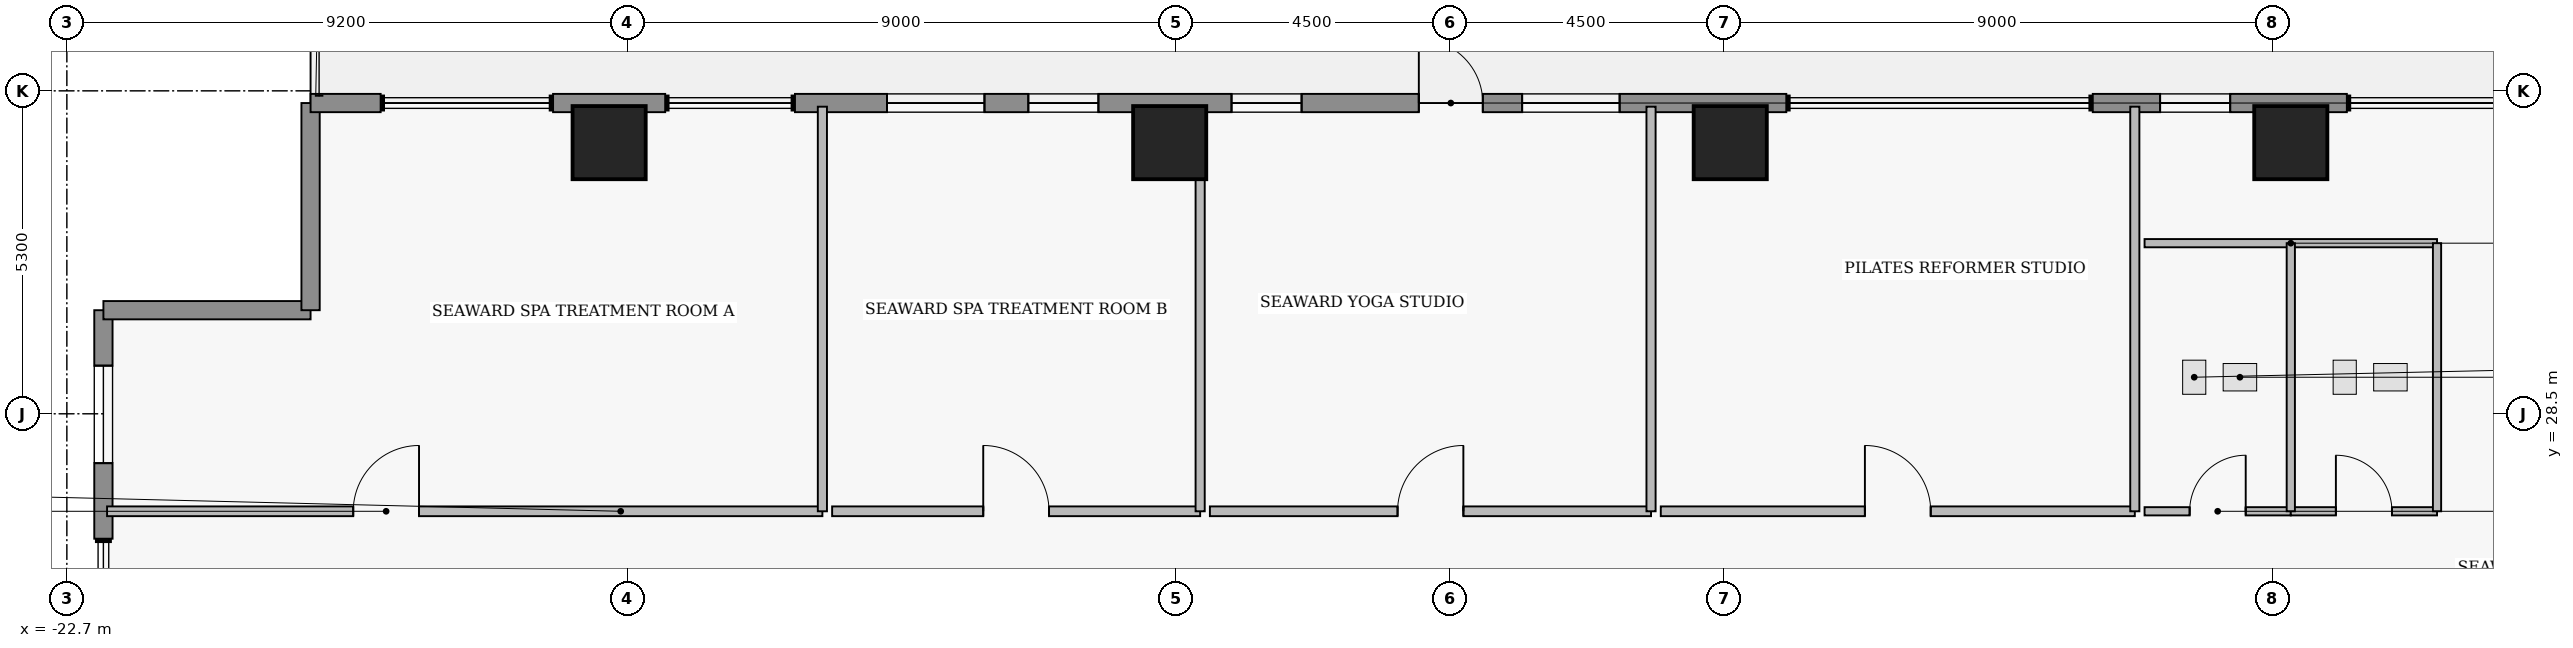
"""IFC4 building model, lengths in metres.
Left out: names, types, materials, properties, quantities, classifications, styles, units other than length and angle.
Written with IfcOpenShell. Run it as: python <this file> out.ifc"""

import sys

from ifc_helpers import new_model, si_unit, direction, frame, frame_2d, origin, origin_2d, place, context, subcontext, project, spatial, rectangle, extrude, element, fill, save


model = new_model("IFC4")
c1 = context("Model", 3, precision=1e-05, world=origin(), true_north=direction((0.0, 1.0)))
c2 = subcontext(c1, "Body", "Model", "MODEL_VIEW")
j1 = project(units=[si_unit("LENGTHUNIT", "METRE"), si_unit("PLANEANGLEUNIT", "RADIAN")], contexts=[c1])
p1 = place(None, origin())
s1 = spatial("IfcSite", under=j1, at=p1, CompositionType="ELEMENT")
p2 = place(p1, origin())
s2 = spatial("IfcBuilding", under=s1, at=p2, CompositionType="ELEMENT")
p3 = place(p2, frame((0.0, 0.0, 172.8)))
s3 = spatial("IfcBuildingStorey", under=s2, at=p3, CompositionType="ELEMENT", Elevation=172.8)
for number, where, z_axis, x_axis in (
    (1, (-13.8, 32.95, 0.0), (0.0, 0.0, 1.0), (1.0, 0.0, 0.0)),
    (2, (-4.6, 32.95, 0.0), (0.0, 0.0, 1.0), (1.0, 0.0, 0.0)),
    (3, (4.6, 32.95, 0.0), (0.0, 0.0, 1.0), (1.0, 0.0, 0.0)),
    (4, (13.8, 32.95, 0.0), (0.0, 0.0, 1.0), (1.0, 0.0, 0.0)),
):
    element("IfcColumn", number, at=place(p3, frame(where, z_axis=z_axis, x_axis=x_axis)), inside=s3, PredefinedType="COLUMN", context=c2, shape_type="SweptSolid", body=[
        extrude(rectangle(XDim=1.2, YDim=1.2, at=origin_2d()), origin(), (0.0, 0.0, 1.0), 4.6),
    ])
p4 = place(p3, frame((-22.1, 26.45, 0.0), z_axis=(0.0, 0.0, 1.0), x_axis=(0.0, 1.0, 0.0)))
e5 = element("IfcWall", 5, at=p4, inside=s3, PredefinedType="STANDARD", context=c2, shape_type="SweptSolid", body=[
    extrude(rectangle(XDim=3.75, YDim=0.3, at=frame_2d((1.875, 0.0))), origin(), (0.0, 0.0, 1.0), 4.38),
])
p5 = place(p4, frame((1.24, 0.0, 0.85)))
e6 = element("IfcOpeningElement", 6, at=p5, cuts=e5, PredefinedType="OPENING", context=c2, shape_type="SweptSolid", body=[
    extrude(rectangle(XDim=1.6, YDim=1.8, at=frame_2d((0.8, 0.9))), frame((0.0, 0.16, 0.0), z_axis=(0.0, -1.0, 0.0), x_axis=(1.0, 0.0, 0.0)), (0.0, 0.0, 1.0), 0.32),
])
for number, where, z_axis, x_axis in (
    (7, (-22.1, 30.2, 0.0), (0.0, 0.0, 1.0), (1.0, 0.0, 0.0)),
    (8, (-18.7, 30.2, 0.0), (0.0, 0.0, 1.0), (0.0, 1.0, 0.0)),
):
    element("IfcWall", number, at=place(p3, frame(where, z_axis=z_axis, x_axis=x_axis)), inside=s3, PredefinedType="STANDARD", context=c2, shape_type="SweptSolid", body=[
        extrude(rectangle(XDim=3.4, YDim=0.3, at=frame_2d((1.7, 0.0))), origin(), (0.0, 0.0, 1.0), 4.38),
    ])
p6 = place(p3, frame((-18.7, 33.6, 0.0), z_axis=(0.0, 0.0, 1.0), x_axis=(1.0, 0.0, 0.0)))
e9 = element("IfcWall", 9, at=p6, inside=s3, PredefinedType="STANDARD", context=c2, shape_type="SweptSolid", body=[
    extrude(rectangle(XDim=1.15, YDim=0.3, at=frame_2d((0.575, 0.0))), origin(), (0.0, 0.0, 1.0), 4.38),
])
p7 = place(p3, frame((-14.72, 33.6, 0.0), z_axis=(0.0, 0.0, 1.0), x_axis=(1.0, 0.0, 0.0)))
e10 = element("IfcWall", 10, at=p7, inside=s3, PredefinedType="STANDARD", context=c2, shape_type="SweptSolid", body=[
    extrude(rectangle(XDim=1.84, YDim=0.3, at=frame_2d((0.92, 0.0))), origin(), (0.0, 0.0, 1.0), 4.38),
])
p8 = place(p3, frame((-10.75, 33.6, 0.0), z_axis=(0.0, 0.0, 1.0), x_axis=(1.0, 0.0, 0.0)))
e11 = element("IfcWall", 11, at=p8, inside=s3, PredefinedType="STANDARD", context=c2, shape_type="SweptSolid", body=[
    extrude(rectangle(XDim=16.27, YDim=0.3, at=frame_2d((8.135, 0.0))), origin(), (0.0, 0.0, 1.0), 4.38),
])
p9 = place(p8, frame((10.239, 0.0, 0.0)))
e12 = element("IfcOpeningElement", 12, at=p9, cuts=e11, PredefinedType="OPENING", context=c2, shape_type="SweptSolid", body=[
    extrude(rectangle(XDim=1.05, YDim=2.2, at=frame_2d((0.525, 1.1))), frame((0.0, 0.16, 0.0), z_axis=(0.0, -1.0, 0.0), x_axis=(1.0, 0.0, 0.0)), (0.0, 0.0, 1.0), 0.32),
])
p10 = place(p8, frame((1.51, 0.0, 0.85)))
e13 = element("IfcOpeningElement", 13, at=p10, cuts=e11, PredefinedType="OPENING", context=c2, shape_type="SweptSolid", body=[
    extrude(rectangle(XDim=1.6, YDim=1.8, at=frame_2d((0.8, 0.9))), frame((0.0, 0.16, 0.0), z_axis=(0.0, -1.0, 0.0), x_axis=(1.0, 0.0, 0.0)), (0.0, 0.0, 1.0), 0.32),
])
p11 = place(p8, frame((3.83, 0.0, 0.95)))
e14 = element("IfcOpeningElement", 14, at=p11, cuts=e11, PredefinedType="OPENING", context=c2, shape_type="SweptSolid", body=[
    extrude(rectangle(XDim=1.15, YDim=1.55, at=frame_2d((0.575, 0.775))), frame((0.0, 0.16, 0.0), z_axis=(0.0, -1.0, 0.0), x_axis=(1.0, 0.0, 0.0)), (0.0, 0.0, 1.0), 0.32),
])
p12 = place(p8, frame((7.165, 0.0, 0.95)))
e15 = element("IfcOpeningElement", 15, at=p12, cuts=e11, PredefinedType="OPENING", context=c2, shape_type="SweptSolid", body=[
    extrude(rectangle(XDim=1.15, YDim=1.55, at=frame_2d((0.575, 0.775))), frame((0.0, 0.16, 0.0), z_axis=(0.0, -1.0, 0.0), x_axis=(1.0, 0.0, 0.0)), (0.0, 0.0, 1.0), 0.32),
])
p13 = place(p8, frame((11.935, 0.0, 0.85)))
e16 = element("IfcOpeningElement", 16, at=p13, cuts=e11, PredefinedType="OPENING", context=c2, shape_type="SweptSolid", body=[
    extrude(rectangle(XDim=1.6, YDim=1.8, at=frame_2d((0.8, 0.9))), frame((0.0, 0.16, 0.0), z_axis=(0.0, -1.0, 0.0), x_axis=(1.0, 0.0, 0.0)), (0.0, 0.0, 1.0), 0.32),
])
p14 = place(p3, frame((10.55, 33.6, 0.0), z_axis=(0.0, 0.0, 1.0), x_axis=(1.0, 0.0, 0.0)))
e17 = element("IfcWall", 17, at=p14, inside=s3, PredefinedType="STANDARD", context=c2, shape_type="SweptSolid", body=[
    extrude(rectangle(XDim=4.17, YDim=0.3, at=frame_2d((2.085, 0.0))), origin(), (0.0, 0.0, 1.0), 4.38),
])
p15 = place(p14, frame((1.105, 0.0, 0.95)))
e18 = element("IfcOpeningElement", 18, at=p15, cuts=e17, PredefinedType="OPENING", context=c2, shape_type="SweptSolid", body=[
    extrude(rectangle(XDim=1.15, YDim=1.55, at=frame_2d((0.575, 0.775))), frame((0.0, 0.16, 0.0), z_axis=(0.0, -1.0, 0.0), x_axis=(1.0, 0.0, 0.0)), (0.0, 0.0, 1.0), 0.32),
])
p16 = place(p3, frame((-22.04, 26.9, 0.0), z_axis=(0.0, 0.0, 1.0), x_axis=(1.0, 0.0, 0.0)))
e19 = element("IfcWall", 19, at=p16, inside=s3, PredefinedType="PARTITIONING", context=c2, shape_type="SweptSolid", body=[
    extrude(rectangle(XDim=11.74, YDim=0.16, at=frame_2d((5.87, 0.0))), origin(), (0.0, 0.0, 1.0), 4.38),
])
p17 = place(p16, frame((4.04, 0.0, 0.0)))
e20 = element("IfcOpeningElement", 20, at=p17, cuts=e19, PredefinedType="OPENING", context=c2, shape_type="SweptSolid", body=[
    extrude(rectangle(XDim=1.08, YDim=2.18, at=frame_2d((0.54, 1.09))), frame((0.0, 0.09, 0.0), z_axis=(0.0, -1.0, 0.0), x_axis=(1.0, 0.0, 0.0)), (0.0, 0.0, 1.0), 0.18),
])
p18 = place(p3, frame((-10.14, 26.9, 0.0), z_axis=(0.0, 0.0, 1.0), x_axis=(1.0, 0.0, 0.0)))
e21 = element("IfcWall", 21, at=p18, inside=s3, PredefinedType="PARTITIONING", context=c2, shape_type="SweptSolid", body=[
    extrude(rectangle(XDim=6.04, YDim=0.16, at=frame_2d((3.02, 0.0))), origin(), (0.0, 0.0, 1.0), 4.38),
])
p19 = place(p18, frame((2.48, 0.0, 0.0)))
e22 = element("IfcOpeningElement", 22, at=p19, cuts=e21, PredefinedType="OPENING", context=c2, shape_type="SweptSolid", body=[
    extrude(rectangle(XDim=1.08, YDim=2.18, at=frame_2d((0.54, 1.09))), frame((0.0, 0.09, 0.0), z_axis=(0.0, -1.0, 0.0), x_axis=(1.0, 0.0, 0.0)), (0.0, 0.0, 1.0), 0.18),
])
p20 = place(p3, frame((-3.94, 26.9, 0.0), z_axis=(0.0, 0.0, 1.0), x_axis=(1.0, 0.0, 0.0)))
e23 = element("IfcWall", 23, at=p20, inside=s3, PredefinedType="PARTITIONING", context=c2, shape_type="SweptSolid", body=[
    extrude(rectangle(XDim=7.24, YDim=0.16, at=frame_2d((3.62, 0.0))), origin(), (0.0, 0.0, 1.0), 4.38),
])
p21 = place(p20, frame((3.08, 0.0, 0.0)))
e24 = element("IfcOpeningElement", 24, at=p21, cuts=e23, PredefinedType="OPENING", context=c2, shape_type="SweptSolid", body=[
    extrude(rectangle(XDim=1.08, YDim=2.18, at=frame_2d((0.54, 1.09))), frame((0.0, 0.09, 0.0), z_axis=(0.0, -1.0, 0.0), x_axis=(1.0, 0.0, 0.0)), (0.0, 0.0, 1.0), 0.18),
])
p22 = place(p3, frame((3.46, 26.9, 0.0), z_axis=(0.0, 0.0, 1.0), x_axis=(1.0, 0.0, 0.0)))
e25 = element("IfcWall", 25, at=p22, inside=s3, PredefinedType="PARTITIONING", context=c2, shape_type="SweptSolid", body=[
    extrude(rectangle(XDim=7.78, YDim=0.16, at=frame_2d((3.89, 0.0))), origin(), (0.0, 0.0, 1.0), 4.38),
])
p23 = place(p22, frame((3.35, 0.0, 0.0)))
e26 = element("IfcOpeningElement", 26, at=p23, cuts=e25, PredefinedType="OPENING", context=c2, shape_type="SweptSolid", body=[
    extrude(rectangle(XDim=1.08, YDim=2.18, at=frame_2d((0.54, 1.09))), frame((0.0, 0.09, 0.0), z_axis=(0.0, -1.0, 0.0), x_axis=(1.0, 0.0, 0.0)), (0.0, 0.0, 1.0), 0.18),
])
p24 = place(p3, frame((11.4, 26.9, 0.0), z_axis=(0.0, 0.0, 1.0), x_axis=(1.0, 0.0, 0.0)))
e27 = element("IfcWall", 27, at=p24, inside=s3, PredefinedType="PLUMBINGWALL", context=c2, shape_type="SweptSolid", body=[
    extrude(rectangle(XDim=2.4, YDim=0.135, at=frame_2d((1.2, 0.0))), origin(), (0.0, 0.0, 1.0), 4.38),
])
p25 = place(p24, frame((0.74, 0.0, 0.0)))
e28 = element("IfcOpeningElement", 28, at=p25, cuts=e27, PredefinedType="OPENING", context=c2, shape_type="SweptSolid", body=[
    extrude(rectangle(XDim=0.92, YDim=2.12, at=frame_2d((0.46, 1.06))), frame((0.0, 0.077, 0.0), z_axis=(0.0, -1.0, 0.0), x_axis=(1.0, 0.0, 0.0)), (0.0, 0.0, 1.0), 0.155),
])
p26 = place(p3, frame((13.8, 26.9, 0.0), z_axis=(0.0, 0.0, 1.0), x_axis=(1.0, 0.0, 0.0)))
e29 = element("IfcWall", 29, at=p26, inside=s3, PredefinedType="PLUMBINGWALL", context=c2, shape_type="SweptSolid", body=[
    extrude(rectangle(XDim=2.4, YDim=0.135, at=frame_2d((1.2, 0.0))), origin(), (0.0, 0.0, 1.0), 4.38),
])
p27 = place(p26, frame((0.74, 0.0, 0.0)))
e30 = element("IfcOpeningElement", 30, at=p27, cuts=e29, PredefinedType="OPENING", context=c2, shape_type="SweptSolid", body=[
    extrude(rectangle(XDim=0.92, YDim=2.12, at=frame_2d((0.46, 1.06))), frame((0.0, 0.077, 0.0), z_axis=(0.0, -1.0, 0.0), x_axis=(1.0, 0.0, 0.0)), (0.0, 0.0, 1.0), 0.155),
])
for number, where, z_axis, x_axis in (
    (31, (-10.3, 26.9, 0.0), (0.0, 0.0, 1.0), (0.0, 1.0, 0.0)),
    (32, (-4.1, 26.9, 0.0), (0.0, 0.0, 1.0), (0.0, 1.0, 0.0)),
    (33, (3.3, 26.9, 0.0), (0.0, 0.0, 1.0), (0.0, 1.0, 0.0)),
    (34, (11.24, 26.9, 0.0), (0.0, 0.0, 1.0), (0.0, 1.0, 0.0)),
):
    element("IfcWall", number, at=place(p3, frame(where, z_axis=z_axis, x_axis=x_axis)), inside=s3, PredefinedType="PARTITIONING", context=c2, shape_type="SweptSolid", body=[
        extrude(rectangle(XDim=6.64, YDim=0.15, at=frame_2d((3.32, 0.0))), origin(), (0.0, 0.0, 1.0), 4.38),
    ])
p28 = place(p3, frame((11.4, 31.3, 0.0), z_axis=(0.0, 0.0, 1.0), x_axis=(1.0, 0.0, 0.0)))
e35 = element("IfcWall", 35, at=p28, inside=s3, PredefinedType="PLUMBINGWALL", context=c2, shape_type="SweptSolid", body=[
    extrude(rectangle(XDim=4.8, YDim=0.135, at=frame_2d((2.4, 0.0))), origin(), (0.0, 0.0, 1.0), 4.38),
])
p29 = place(p3, frame((16.2, 26.9, 0.0), z_axis=(0.0, 0.0, 1.0), x_axis=(0.0, 1.0, 0.0)))
e36 = element("IfcWall", 36, at=p29, inside=s3, PredefinedType="PLUMBINGWALL", context=c2, shape_type="SweptSolid", body=[
    extrude(rectangle(XDim=4.4, YDim=0.135, at=frame_2d((2.2, 0.0))), origin(), (0.0, 0.0, 1.0), 4.38),
])
p30 = place(p3, frame((13.8, 26.9, 0.0), z_axis=(0.0, 0.0, 1.0), x_axis=(0.0, 1.0, 0.0)))
e37 = element("IfcWall", 37, at=p30, inside=s3, PredefinedType="PLUMBINGWALL", context=c2, shape_type="SweptSolid", body=[
    extrude(rectangle(XDim=4.4, YDim=0.135, at=frame_2d((2.2, 0.0))), origin(), (0.0, 0.0, 1.0), 3.369),
])
p31 = place(p5, origin())
e38 = element("IfcWindow", 38, at=p31, inside=s3, PartitioningType="SINGLE_PANEL", PredefinedType="WINDOW", context=c2, shape_type="SweptSolid", body=[
    extrude(rectangle(XDim=1.6, YDim=1.8, at=frame_2d((0.8, 0.9))), frame((0.0, 0.03, 0.0), z_axis=(0.0, -1.0, 0.0), x_axis=(1.0, 0.0, 0.0)), (0.0, 0.0, 1.0), 0.06),
])
fill(e6, e38)
p32 = place(p9, origin())
e39 = element("IfcDoor", 39, at=p32, inside=s3, OperationType="SINGLE_SWING_LEFT", PredefinedType="DOOR", context=c2, shape_type="SweptSolid", body=[
    extrude(rectangle(XDim=1.05, YDim=2.2, at=frame_2d((0.525, 1.1))), frame((0.0, 0.025, 0.0), z_axis=(0.0, -1.0, 0.0), x_axis=(1.0, 0.0, 0.0)), (0.0, 0.0, 1.0), 0.05),
])
fill(e12, e39)
p33 = place(p10, origin())
e40 = element("IfcWindow", 40, at=p33, inside=s3, PartitioningType="SINGLE_PANEL", PredefinedType="WINDOW", context=c2, shape_type="SweptSolid", body=[
    extrude(rectangle(XDim=1.6, YDim=1.8, at=frame_2d((0.8, 0.9))), frame((0.0, 0.03, 0.0), z_axis=(0.0, -1.0, 0.0), x_axis=(1.0, 0.0, 0.0)), (0.0, 0.0, 1.0), 0.06),
])
fill(e13, e40)
p34 = place(p11, origin())
e41 = element("IfcWindow", 41, at=p34, inside=s3, PartitioningType="SINGLE_PANEL", PredefinedType="WINDOW", context=c2, shape_type="SweptSolid", body=[
    extrude(rectangle(XDim=1.15, YDim=1.55, at=frame_2d((0.575, 0.775))), frame((0.0, 0.03, 0.0), z_axis=(0.0, -1.0, 0.0), x_axis=(1.0, 0.0, 0.0)), (0.0, 0.0, 1.0), 0.06),
])
fill(e14, e41)
p35 = place(p12, origin())
e42 = element("IfcWindow", 42, at=p35, inside=s3, PartitioningType="SINGLE_PANEL", PredefinedType="WINDOW", context=c2, shape_type="SweptSolid", body=[
    extrude(rectangle(XDim=1.15, YDim=1.55, at=frame_2d((0.575, 0.775))), frame((0.0, 0.03, 0.0), z_axis=(0.0, -1.0, 0.0), x_axis=(1.0, 0.0, 0.0)), (0.0, 0.0, 1.0), 0.06),
])
fill(e15, e42)
p36 = place(p13, origin())
e43 = element("IfcWindow", 43, at=p36, inside=s3, PartitioningType="SINGLE_PANEL", PredefinedType="WINDOW", context=c2, shape_type="SweptSolid", body=[
    extrude(rectangle(XDim=1.6, YDim=1.8, at=frame_2d((0.8, 0.9))), frame((0.0, 0.03, 0.0), z_axis=(0.0, -1.0, 0.0), x_axis=(1.0, 0.0, 0.0)), (0.0, 0.0, 1.0), 0.06),
])
fill(e16, e43)
p37 = place(p15, origin())
e44 = element("IfcWindow", 44, at=p37, inside=s3, PartitioningType="SINGLE_PANEL", PredefinedType="WINDOW", context=c2, shape_type="SweptSolid", body=[
    extrude(rectangle(XDim=1.15, YDim=1.55, at=frame_2d((0.575, 0.775))), frame((0.0, 0.03, 0.0), z_axis=(0.0, -1.0, 0.0), x_axis=(1.0, 0.0, 0.0)), (0.0, 0.0, 1.0), 0.06),
])
fill(e18, e44)
p38 = place(p17, origin())
e45 = element("IfcDoor", 45, at=p38, inside=s3, OperationType="SINGLE_SWING_RIGHT", PredefinedType="DOOR", context=c2, shape_type="SweptSolid", body=[
    extrude(rectangle(XDim=1.08, YDim=2.18, at=frame_2d((0.54, 1.09))), frame((0.0, 0.025, 0.0), z_axis=(0.0, -1.0, 0.0), x_axis=(1.0, 0.0, 0.0)), (0.0, 0.0, 1.0), 0.05),
])
fill(e20, e45)
p39 = place(p19, origin())
e46 = element("IfcDoor", 46, at=p39, inside=s3, OperationType="SINGLE_SWING_LEFT", PredefinedType="DOOR", context=c2, shape_type="SweptSolid", body=[
    extrude(rectangle(XDim=1.08, YDim=2.18, at=frame_2d((0.54, 1.09))), frame((0.0, 0.025, 0.0), z_axis=(0.0, -1.0, 0.0), x_axis=(1.0, 0.0, 0.0)), (0.0, 0.0, 1.0), 0.05),
])
fill(e22, e46)
p40 = place(p21, origin())
e47 = element("IfcDoor", 47, at=p40, inside=s3, OperationType="SINGLE_SWING_RIGHT", PredefinedType="DOOR", context=c2, shape_type="SweptSolid", body=[
    extrude(rectangle(XDim=1.08, YDim=2.18, at=frame_2d((0.54, 1.09))), frame((0.0, 0.025, 0.0), z_axis=(0.0, -1.0, 0.0), x_axis=(1.0, 0.0, 0.0)), (0.0, 0.0, 1.0), 0.05),
])
fill(e24, e47)
p41 = place(p23, origin())
e48 = element("IfcDoor", 48, at=p41, inside=s3, OperationType="SINGLE_SWING_LEFT", PredefinedType="DOOR", context=c2, shape_type="SweptSolid", body=[
    extrude(rectangle(XDim=1.08, YDim=2.18, at=frame_2d((0.54, 1.09))), frame((0.0, 0.025, 0.0), z_axis=(0.0, -1.0, 0.0), x_axis=(1.0, 0.0, 0.0)), (0.0, 0.0, 1.0), 0.05),
])
fill(e26, e48)
p42 = place(p25, origin())
e49 = element("IfcDoor", 49, at=p42, inside=s3, OperationType="SINGLE_SWING_RIGHT", PredefinedType="DOOR", context=c2, shape_type="SweptSolid", body=[
    extrude(rectangle(XDim=0.92, YDim=2.12, at=frame_2d((0.46, 1.06))), frame((0.0, 0.025, 0.0), z_axis=(0.0, -1.0, 0.0), x_axis=(1.0, 0.0, 0.0)), (0.0, 0.0, 1.0), 0.05),
])
fill(e28, e49)
p43 = place(p27, origin())
e50 = element("IfcDoor", 50, at=p43, inside=s3, OperationType="SINGLE_SWING_LEFT", PredefinedType="DOOR", context=c2, shape_type="SweptSolid", body=[
    extrude(rectangle(XDim=0.92, YDim=2.12, at=frame_2d((0.46, 1.06))), frame((0.0, 0.025, 0.0), z_axis=(0.0, -1.0, 0.0), x_axis=(1.0, 0.0, 0.0)), (0.0, 0.0, 1.0), 0.05),
])
fill(e30, e50)
save(model, sys.argv[1])
